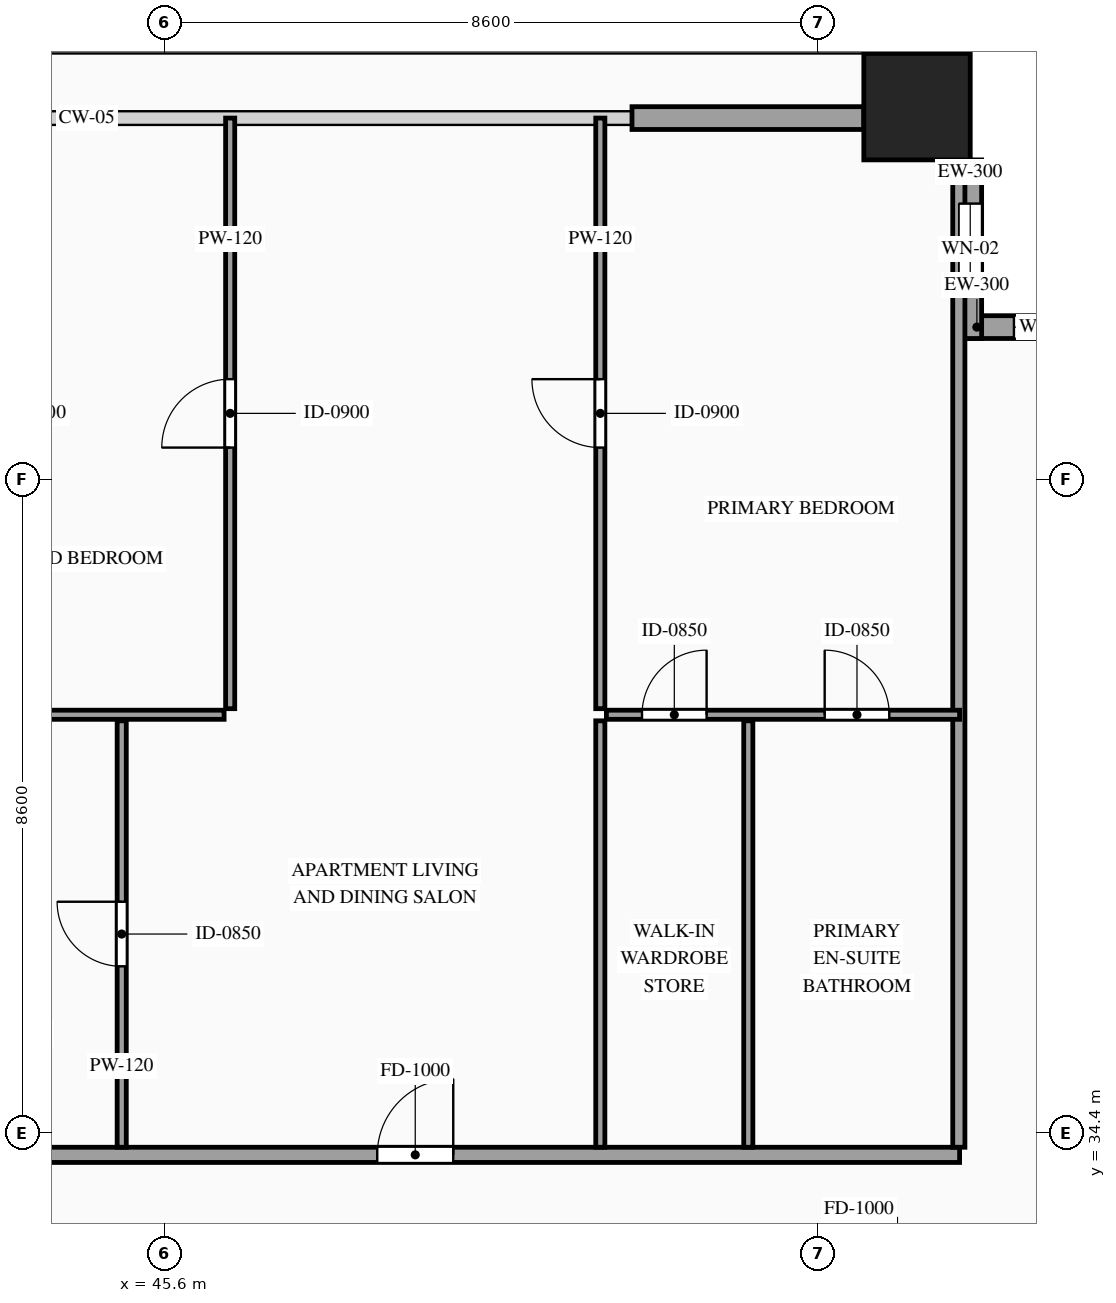
"""IFC4 building model, lengths in metres.
Left out: names, types, materials, properties, quantities, classifications, styles, units other than length and angle.
Written with IfcOpenShell. Run it as: python <this file> out.ifc"""

import sys

from ifc_helpers import new_model, si_unit, direction, frame, frame_2d, origin, origin_2d, place, context, subcontext, project, spatial, rectangle, hollow_rectangle, extrude, source, transform, mapped, element, fill, save


model = new_model("IFC4")
c1 = context("Model", 3, precision=1e-05, world=origin(), true_north=direction((0.0, 1.0)))
c2 = subcontext(c1, "Body", "Model", "MODEL_VIEW")
j1 = project(units=[si_unit("LENGTHUNIT", "METRE"), si_unit("PLANEANGLEUNIT", "RADIAN")], contexts=[c1])
p1 = place(None, origin())
s1 = spatial("IfcSite", under=j1, at=p1, CompositionType="ELEMENT")
p2 = place(p1, origin())
s2 = spatial("IfcBuilding", under=s1, at=p2, CompositionType="ELEMENT")
p3 = place(p2, frame((0.0, 0.0, 198.5)))
s3 = spatial("IfcBuildingStorey", under=s2, at=p3, CompositionType="ELEMENT", Elevation=198.5)
m1 = source(origin(), c2, "Body", "SweptSolid", [
    extrude(hollow_rectangle(XDim=1.4, YDim=1.4, WallThickness=0.06, at=origin_2d()), origin(), (0.0, 0.0, 1.0), 3.5),
])
p4 = place(p3, frame((55.5, 47.9, 0.0), z_axis=(0.0, 0.0, 1.0), x_axis=(1.0, 0.0, 0.0)))
e1 = element("IfcColumn", 1, at=p4, inside=s3, PredefinedType="COLUMN", context=c2, shape_type="MappedRepresentation", body=[
    mapped(m1, transform((0.0, 0.0, 0.0), scale=1.0)),
])
p5 = place(p3, frame((58.4, 45.0, 0.0), z_axis=(0.0, 0.0, 1.0), x_axis=(-1.0, 0.0, 0.0)))
e2 = element("IfcWall", 2, at=p5, inside=s3, PredefinedType="SOLIDWALL", context=c2, shape_type="SweptSolid", body=[
    extrude(rectangle(XDim=2.35, YDim=0.3, at=frame_2d((1.175, 0.0))), origin(), (0.0, 0.0, 1.0), 3.28),
])
p6 = place(p5, frame((0.725, 0.0, 0.85)))
e3 = element("IfcOpeningElement", 3, at=p6, cuts=e2, PredefinedType="OPENING", context=c2, shape_type="SweptSolid", body=[
    extrude(rectangle(XDim=0.9, YDim=1.5, at=frame_2d((0.45, 0.75))), frame((0.0, 0.165, 0.0), z_axis=(0.0, -1.0, 0.0), x_axis=(1.0, 0.0, 0.0)), (0.0, 0.0, 1.0), 0.33),
])
p7 = place(p3, frame((56.2, 44.85, 0.0), z_axis=(0.0, 0.0, 1.0), x_axis=(0.0, 1.0, 0.0)))
e4 = element("IfcWall", 4, at=p7, inside=s3, PredefinedType="SOLIDWALL", context=c2, shape_type="SweptSolid", body=[
    extrude(rectangle(XDim=2.35, YDim=0.3, at=frame_2d((1.175, 0.0))), origin(), (0.0, 0.0, 1.0), 3.28),
])
p8 = place(p7, frame((0.575, 0.0, 0.85)))
e5 = element("IfcOpeningElement", 5, at=p8, cuts=e4, PredefinedType="OPENING", context=c2, shape_type="SweptSolid", body=[
    extrude(rectangle(XDim=1.2, YDim=2.1, at=frame_2d((0.6, 1.05))), frame((0.0, 0.165, 0.0), z_axis=(0.0, -1.0, 0.0), x_axis=(1.0, 0.0, 0.0)), (0.0, 0.0, 1.0), 0.33),
])
m2 = source(origin(), c2, "Body", "SweptSolid", [
    extrude(rectangle(XDim=3.05, YDim=0.3, at=frame_2d((1.525, 0.0))), origin(), (0.0, 0.0, 1.0), 2.835),
])
p9 = place(p3, frame((51.75, 47.75, 0.0), z_axis=(0.0, 0.0, 1.0), x_axis=(1.0, 0.0, 0.0)))
e6 = element("IfcWall", 6, at=p9, inside=s3, PredefinedType="SOLIDWALL", context=c2, shape_type="MappedRepresentation", body=[
    mapped(m2, transform((0.0, 0.0, 0.0), scale=1.0)),
])
p10 = place(p3, frame((37.842, 34.11, 0.0), z_axis=(0.0, 0.0, 1.0), x_axis=(1.0, 0.0, 0.0)))
e7 = element("IfcWall", 7, at=p10, inside=s3, PredefinedType="PARTITIONING", context=c2, shape_type="SweptSolid", body=[
    extrude(rectangle(XDim=18.218, YDim=0.2, at=frame_2d((9.109, 0.0))), origin(), (0.0, 0.0, 1.0), 3.28),
])
p11 = place(p10, frame((10.556, 0.0, 0.0)))
e8 = element("IfcOpeningElement", 8, at=p11, cuts=e7, PredefinedType="OPENING", context=c2, shape_type="SweptSolid", body=[
    extrude(rectangle(XDim=1.0, YDim=2.2, at=frame_2d((0.5, 1.1))), frame((0.0, 0.115, 0.0), z_axis=(0.0, -1.0, 0.0), x_axis=(1.0, 0.0, 0.0)), (0.0, 0.0, 1.0), 0.23),
])
m3 = source(origin(), c2, "Body", "SweptSolid", [
    extrude(rectangle(XDim=13.39, YDim=0.16, at=frame_2d((6.695, 0.0))), origin(), (0.0, 0.0, 1.0), 3.28),
])
p12 = place(p3, frame((56.05, 34.21, 0.0), z_axis=(0.0, 0.0, 1.0), x_axis=(0.0, 1.0, 0.0)))
e9 = element("IfcWall", 9, at=p12, inside=s3, PredefinedType="PARTITIONING", context=c2, shape_type="MappedRepresentation", body=[
    mapped(m3, transform((0.0, 0.0, 0.0), scale=1.0)),
])
p13 = place(p3, frame((45.036, 34.21, 0.0), z_axis=(0.0, 0.0, 1.0), x_axis=(0.0, 1.0, 0.0)))
e10 = element("IfcWall", 10, at=p13, inside=s3, PredefinedType="PARTITIONING", context=c2, shape_type="SweptSolid", body=[
    extrude(rectangle(XDim=5.61, YDim=0.12, at=frame_2d((2.805, 0.0))), origin(), (0.0, 0.0, 1.0), 3.28),
])
p14 = place(p13, frame((2.38, 0.0, 0.0)))
e11 = element("IfcOpeningElement", 11, at=p14, cuts=e10, PredefinedType="OPENING", context=c2, shape_type="SweptSolid", body=[
    extrude(rectangle(XDim=0.85, YDim=2.1, at=frame_2d((0.425, 1.05))), frame((0.0, 0.075, 0.0), z_axis=(0.0, -1.0, 0.0), x_axis=(1.0, 0.0, 0.0)), (0.0, 0.0, 1.0), 0.15),
])
m4 = source(origin(), c2, "Body", "SweptSolid", [
    extrude(rectangle(XDim=5.61, YDim=0.12, at=frame_2d((2.805, 0.0))), origin(), (0.0, 0.0, 1.0), 3.28),
])
for number, where, z_axis, x_axis in (
    (12, (53.28, 34.21, 0.0), (0.0, 0.0, 1.0), (0.0, 1.0, 0.0)),
    (13, (51.333, 34.21, 0.0), (0.0, 0.0, 1.0), (0.0, 1.0, 0.0)),
):
    element("IfcWall", number, at=place(p3, frame(where, z_axis=z_axis, x_axis=x_axis)), inside=s3, PredefinedType="PARTITIONING", context=c2, shape_type="MappedRepresentation", body=[
        mapped(m4, transform((0.0, 0.0, 0.0), scale=1.0)),
    ])
p15 = place(p3, frame((51.413, 39.9, 0.0), z_axis=(0.0, 0.0, 1.0), x_axis=(1.0, 0.0, 0.0)))
e14 = element("IfcWall", 14, at=p15, inside=s3, PredefinedType="PARTITIONING", context=c2, shape_type="SweptSolid", body=[
    extrude(rectangle(XDim=4.647, YDim=0.12, at=frame_2d((2.323, 0.0))), origin(), (0.0, 0.0, 1.0), 3.28),
])
p16 = place(p15, frame((2.872, 0.0, 0.0)))
e15 = element("IfcOpeningElement", 15, at=p16, cuts=e14, PredefinedType="OPENING", context=c2, shape_type="SweptSolid", body=[
    extrude(rectangle(XDim=0.85, YDim=2.1, at=frame_2d((0.425, 1.05))), frame((0.0, 0.075, 0.0), z_axis=(0.0, -1.0, 0.0), x_axis=(1.0, 0.0, 0.0)), (0.0, 0.0, 1.0), 0.15),
])
p17 = place(p15, frame((0.469, 0.0, 0.0)))
e16 = element("IfcOpeningElement", 16, at=p17, cuts=e14, PredefinedType="OPENING", context=c2, shape_type="SweptSolid", body=[
    extrude(rectangle(XDim=0.85, YDim=2.1, at=frame_2d((0.425, 1.05))), frame((0.0, 0.075, 0.0), z_axis=(0.0, -1.0, 0.0), x_axis=(1.0, 0.0, 0.0)), (0.0, 0.0, 1.0), 0.15),
])
p18 = place(p3, frame((51.333, 39.98, 0.0), z_axis=(0.0, 0.0, 1.0), x_axis=(0.0, 1.0, 0.0)))
e17 = element("IfcWall", 17, at=p18, inside=s3, PredefinedType="PARTITIONING", context=c2, shape_type="SweptSolid", body=[
    extrude(rectangle(XDim=7.77, YDim=0.12, at=frame_2d((3.885, 0.0))), origin(), (0.0, 0.0, 1.0), 3.28),
])
p19 = place(p18, frame((3.435, 0.0, 0.0)))
e18 = element("IfcOpeningElement", 18, at=p19, cuts=e17, PredefinedType="OPENING", context=c2, shape_type="SweptSolid", body=[
    extrude(rectangle(XDim=0.9, YDim=2.15, at=frame_2d((0.45, 1.075))), frame((0.0, 0.075, 0.0), z_axis=(0.0, -1.0, 0.0), x_axis=(1.0, 0.0, 0.0)), (0.0, 0.0, 1.0), 0.15),
])
m5 = source(origin(), c2, "Body", "SweptSolid", [
    extrude(rectangle(XDim=3.827, YDim=0.12, at=frame_2d((1.914, 0.0))), origin(), (0.0, 0.0, 1.0), 2.875),
])
p20 = place(p3, frame((42.556, 39.9, 0.0), z_axis=(0.0, 0.0, 1.0), x_axis=(1.0, 0.0, 0.0)))
e19 = element("IfcWall", 19, at=p20, inside=s3, PredefinedType="PARTITIONING", context=c2, shape_type="MappedRepresentation", body=[
    mapped(m5, transform((0.0, 0.0, 0.0), scale=1.0)),
])
p21 = place(p3, frame((46.463, 39.98, 0.0), z_axis=(0.0, 0.0, 1.0), x_axis=(0.0, 1.0, 0.0)))
e20 = element("IfcWall", 20, at=p21, inside=s3, PredefinedType="PARTITIONING", context=c2, shape_type="SweptSolid", body=[
    extrude(rectangle(XDim=7.77, YDim=0.12, at=frame_2d((3.885, 0.0))), origin(), (0.0, 0.0, 1.0), 3.28),
])
p22 = place(p21, frame((3.435, 0.0, 0.0)))
e21 = element("IfcOpeningElement", 21, at=p22, cuts=e20, PredefinedType="OPENING", context=c2, shape_type="SweptSolid", body=[
    extrude(rectangle(XDim=0.9, YDim=2.15, at=frame_2d((0.45, 1.075))), frame((0.0, 0.075, 0.0), z_axis=(0.0, -1.0, 0.0), x_axis=(1.0, 0.0, 0.0)), (0.0, 0.0, 1.0), 0.15),
])
m6 = source(origin(), c2, "Body", "SweptSolid", [
    extrude(rectangle(XDim=0.9, YDim=1.5, at=frame_2d((0.45, 0.75))), frame((0.0, 0.03, 0.0), z_axis=(0.0, -1.0, 0.0), x_axis=(1.0, 0.0, 0.0)), (0.0, 0.0, 1.0), 0.06),
])
p23 = place(p6, origin())
e22 = element("IfcWindow", 22, at=p23, inside=s3, PartitioningType="SINGLE_PANEL", PredefinedType="WINDOW", context=c2, shape_type="MappedRepresentation", body=[
    mapped(m6, transform((0.0, 0.0, 0.0), scale=1.0)),
])
fill(e3, e22)
m7 = source(origin(), c2, "Body", "SweptSolid", [
    extrude(rectangle(XDim=1.2, YDim=2.1, at=frame_2d((0.6, 1.05))), frame((0.0, 0.03, 0.0), z_axis=(0.0, -1.0, 0.0), x_axis=(1.0, 0.0, 0.0)), (0.0, 0.0, 1.0), 0.06),
])
p24 = place(p8, origin())
e23 = element("IfcWindow", 23, at=p24, inside=s3, PartitioningType="SINGLE_PANEL", PredefinedType="WINDOW", context=c2, shape_type="MappedRepresentation", body=[
    mapped(m7, transform((0.0, 0.0, 0.0), scale=1.0)),
])
fill(e5, e23)
m8 = source(origin(), c2, "Body", "SweptSolid", [
    extrude(rectangle(XDim=1.0, YDim=2.2, at=frame_2d((0.5, 1.1))), frame((0.0, 0.025, 0.0), z_axis=(0.0, -1.0, 0.0), x_axis=(1.0, 0.0, 0.0)), (0.0, 0.0, 1.0), 0.05),
])
p25 = place(p11, origin())
e24 = element("IfcDoor", 24, at=p25, inside=s3, OperationType="SINGLE_SWING_RIGHT", PredefinedType="DOOR", context=c2, shape_type="MappedRepresentation", body=[
    mapped(m8, transform((0.0, 0.0, 0.0), scale=1.0)),
])
fill(e8, e24)
m9 = source(origin(), c2, "Body", "SweptSolid", [
    extrude(rectangle(XDim=0.85, YDim=2.1, at=frame_2d((0.425, 1.05))), frame((0.0, 0.025, 0.0), z_axis=(0.0, -1.0, 0.0), x_axis=(1.0, 0.0, 0.0)), (0.0, 0.0, 1.0), 0.05),
])
p26 = place(p14, origin())
e25 = element("IfcDoor", 25, at=p26, inside=s3, OperationType="SINGLE_SWING_RIGHT", PredefinedType="DOOR", context=c2, shape_type="MappedRepresentation", body=[
    mapped(m9, transform((0.0, 0.0, 0.0), scale=1.0)),
])
fill(e11, e25)
p27 = place(p16, origin())
e26 = element("IfcDoor", 26, at=p27, inside=s3, OperationType="SINGLE_SWING_LEFT", PredefinedType="DOOR", context=c2, shape_type="MappedRepresentation", body=[
    mapped(m9, transform((0.0, 0.0, 0.0), scale=1.0)),
])
fill(e15, e26)
p28 = place(p17, origin())
e27 = element("IfcDoor", 27, at=p28, inside=s3, OperationType="SINGLE_SWING_RIGHT", PredefinedType="DOOR", context=c2, shape_type="MappedRepresentation", body=[
    mapped(m9, transform((0.0, 0.0, 0.0), scale=1.0)),
])
fill(e16, e27)
m10 = source(origin(), c2, "Body", "SweptSolid", [
    extrude(rectangle(XDim=0.9, YDim=2.15, at=frame_2d((0.45, 1.075))), frame((0.0, 0.025, 0.0), z_axis=(0.0, -1.0, 0.0), x_axis=(1.0, 0.0, 0.0)), (0.0, 0.0, 1.0), 0.05),
])
p29 = place(p19, origin())
e28 = element("IfcDoor", 28, at=p29, inside=s3, OperationType="SINGLE_SWING_RIGHT", PredefinedType="DOOR", context=c2, shape_type="MappedRepresentation", body=[
    mapped(m10, transform((0.0, 0.0, 0.0), scale=1.0)),
])
fill(e18, e28)
p30 = place(p22, origin())
e29 = element("IfcDoor", 29, at=p30, inside=s3, OperationType="SINGLE_SWING_LEFT", PredefinedType="DOOR", context=c2, shape_type="MappedRepresentation", body=[
    mapped(m10, transform((0.0, 0.0, 0.0), scale=1.0)),
])
fill(e21, e29)
save(model, sys.argv[1])
